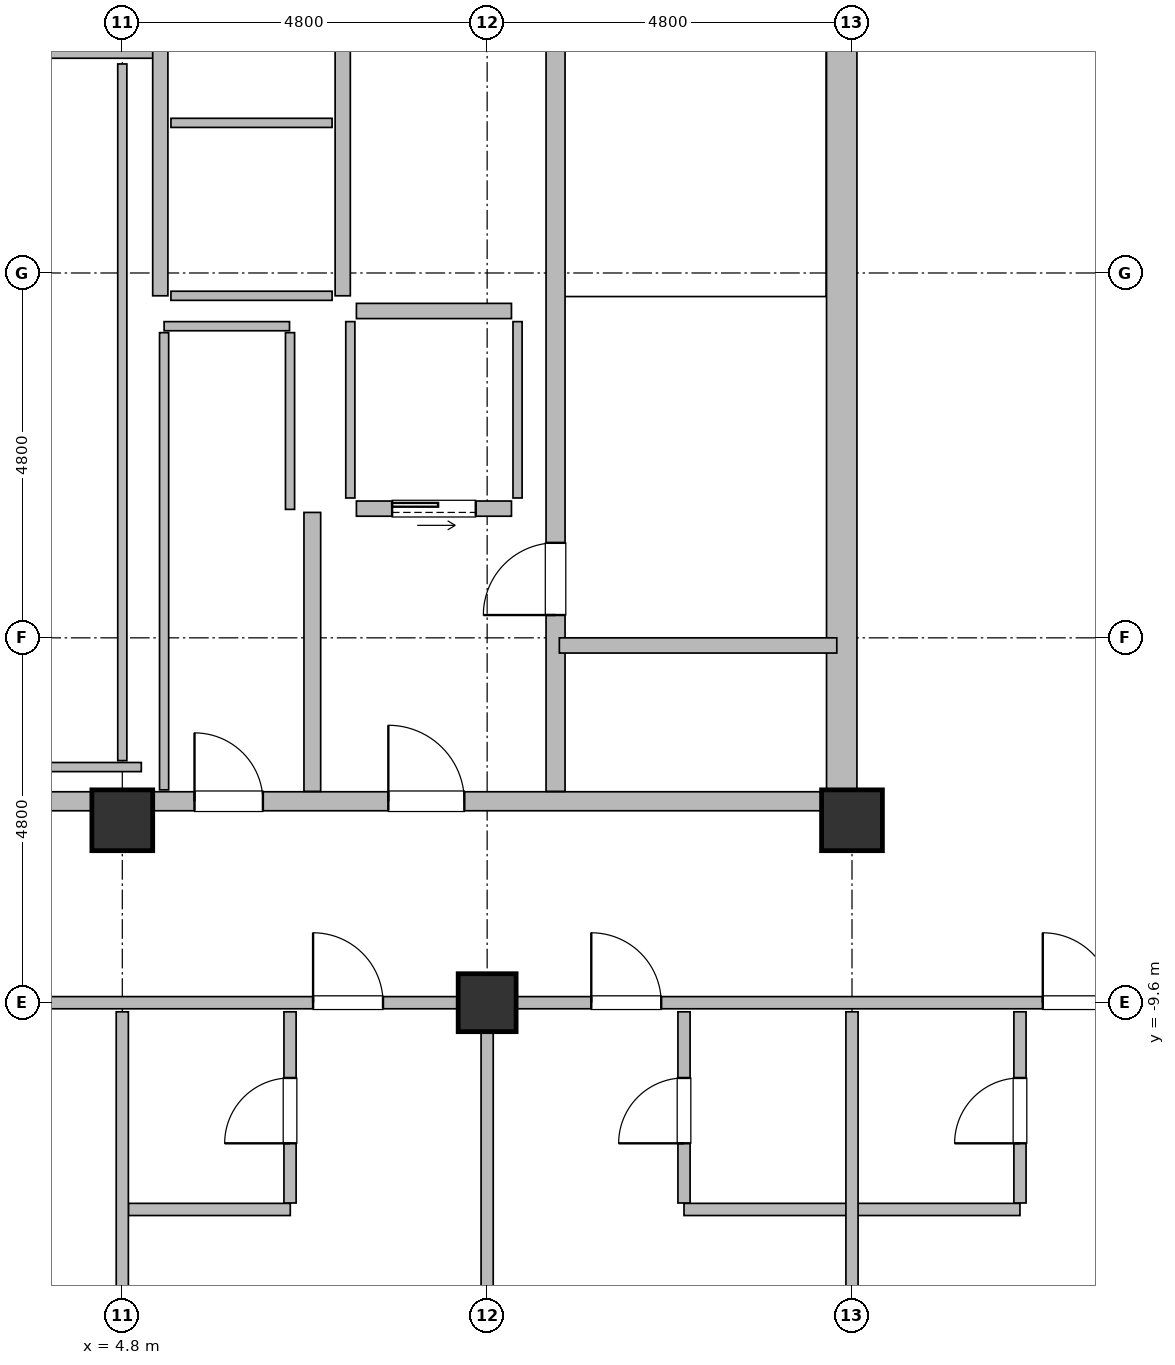
"""IFC4 building model, lengths in metres.
Left out: names, types, materials, properties, quantities, classifications, styles, units other than length and angle.
Written with IfcOpenShell. Run it as: python <this file> out.ifc"""

import sys

from ifc_helpers import new_model, si_unit, direction, frame, frame_2d, origin, origin_2d, place, context, subcontext, project, spatial, rectangle, hollow_rectangle, hollow_circle, extrude, element, fill, save


model = new_model("IFC4")
c1 = context("Model", 3, precision=1e-05, world=origin(), true_north=direction((0.0, 1.0)))
c2 = subcontext(c1, "Body", "Model", "MODEL_VIEW")
j1 = project(units=[si_unit("LENGTHUNIT", "METRE"), si_unit("PLANEANGLEUNIT", "RADIAN")], contexts=[c1])
p1 = place(None, origin())
s1 = spatial("IfcSite", under=j1, at=p1, CompositionType="ELEMENT")
p2 = place(p1, origin())
s2 = spatial("IfcBuilding", under=s1, at=p2, CompositionType="ELEMENT")
p3 = place(p2, frame((0.0, 0.0, 48.5)))
s3 = spatial("IfcBuildingStorey", under=s2, at=p3, CompositionType="ELEMENT", Elevation=48.5)
p4 = place(p3, frame((4.8, -7.2, 0.0), z_axis=(0.0, 0.0, 1.0), x_axis=(1.0, 0.0, 0.0)))
e1 = element("IfcColumn", 1, at=p4, inside=s3, PredefinedType="COLUMN", context=c2, shape_type="SweptSolid", body=[
    extrude(hollow_rectangle(XDim=0.8, YDim=0.8, WallThickness=0.036, at=origin_2d()), origin(), (0.0, 0.0, 1.0), 3.7),
])
p5 = place(p3, frame((9.6, -9.6, 0.0), z_axis=(0.0, 0.0, 1.0), x_axis=(1.0, 0.0, 0.0)))
e2 = element("IfcColumn", 2, at=p5, inside=s3, PredefinedType="COLUMN", context=c2, shape_type="SweptSolid", body=[
    extrude(hollow_circle(Radius=0.381, WallThickness=0.032, at=origin_2d()), origin(), (0.0, 0.0, 1.0), 3.7),
])
p6 = place(p3, frame((14.4, -7.2, 0.0), z_axis=(0.0, 0.0, 1.0), x_axis=(1.0, 0.0, 0.0)))
e3 = element("IfcColumn", 3, at=p6, inside=s3, PredefinedType="COLUMN", context=c2, shape_type="SweptSolid", body=[
    extrude(hollow_rectangle(XDim=0.8, YDim=0.8, WallThickness=0.036, at=origin_2d()), origin(), (0.0, 0.0, 1.0), 3.7),
])
p7 = place(p3, frame((14.265, -7.2, -0.18), z_axis=(0.0, 0.0, 1.0), x_axis=(0.0, 1.0, 0.0)))
e4 = element("IfcWall", 4, at=p7, inside=s3, PredefinedType="SHEAR", context=c2, shape_type="SweptSolid", body=[
    extrude(rectangle(XDim=14.4, YDim=0.4, at=frame_2d((7.2, 0.0))), origin(), (0.0, 0.0, 1.0), 3.7),
])
p8 = place(p3, frame((-4.6, -6.95, 0.0), z_axis=(0.0, 0.0, 1.0), x_axis=(1.0, 0.0, 0.0)))
e5 = element("IfcWall", 5, at=p8, inside=s3, PredefinedType="SOLIDWALL", context=c2, shape_type="SweptSolid", body=[
    extrude(rectangle(XDim=9.2, YDim=0.25, at=frame_2d((4.6, 0.0))), origin(), (0.0, 0.0, 1.0), 2.32),
])
p9 = place(p8, frame((0.8, 0.0, 0.0)))
e6 = element("IfcOpeningElement", 6, at=p9, cuts=e5, PredefinedType="OPENING", context=c2, shape_type="SweptSolid", body=[
    extrude(rectangle(XDim=1.2, YDim=2.2, at=frame_2d((0.6, 1.1))), frame((0.0, 0.14, 0.0), z_axis=(0.0, -1.0, 0.0), x_axis=(1.0, 0.0, 0.0)), (0.0, 0.0, 1.0), 0.28),
])
p10 = place(p8, frame((5.55, 0.0, 0.0)))
e7 = element("IfcOpeningElement", 7, at=p10, cuts=e5, PredefinedType="OPENING", context=c2, shape_type="SweptSolid", body=[
    extrude(rectangle(XDim=1.2, YDim=2.2, at=frame_2d((0.6, 1.1))), frame((0.0, 0.14, 0.0), z_axis=(0.0, -1.0, 0.0), x_axis=(1.0, 0.0, 0.0)), (0.0, 0.0, 1.0), 0.28),
])
p11 = place(p3, frame((4.8, -6.95, 0.0), z_axis=(0.0, 0.0, 1.0), x_axis=(1.0, 0.0, 0.0)))
e8 = element("IfcWall", 8, at=p11, inside=s3, PredefinedType="SOLIDWALL", context=c2, shape_type="SweptSolid", body=[
    extrude(rectangle(XDim=9.4, YDim=0.25, at=frame_2d((4.7, 0.0))), origin(), (0.0, 0.0, 1.0), 2.62),
])
p12 = place(p11, frame((3.5, 0.0, 0.0)))
e9 = element("IfcOpeningElement", 9, at=p12, cuts=e8, PredefinedType="OPENING", context=c2, shape_type="SweptSolid", body=[
    extrude(rectangle(XDim=1.0, YDim=2.15, at=frame_2d((0.5, 1.075))), frame((0.0, 0.14, 0.0), z_axis=(0.0, -1.0, 0.0), x_axis=(1.0, 0.0, 0.0)), (0.0, 0.0, 1.0), 0.28),
])
p13 = place(p11, frame((0.95, 0.0, 0.0)))
e10 = element("IfcOpeningElement", 10, at=p13, cuts=e8, PredefinedType="OPENING", context=c2, shape_type="SweptSolid", body=[
    extrude(rectangle(XDim=0.9, YDim=2.1, at=frame_2d((0.45, 1.05))), frame((0.0, 0.14, 0.0), z_axis=(0.0, -1.0, 0.0), x_axis=(1.0, 0.0, 0.0)), (0.0, 0.0, 1.0), 0.28),
])
p14 = place(p3, frame((7.3, -6.82, 0.0), z_axis=(0.0, 0.0, 1.0), x_axis=(0.0, 1.0, 0.0)))
e11 = element("IfcWall", 11, at=p14, inside=s3, PredefinedType="SOLIDWALL", context=c2, shape_type="SweptSolid", body=[
    extrude(rectangle(XDim=3.67, YDim=0.22, at=frame_2d((1.835, 0.0))), origin(), (0.0, 0.0, 1.0), 2.62),
])
p15 = place(p3, frame((10.5, -6.82, -0.18), z_axis=(0.0, 0.0, 1.0), x_axis=(0.0, 1.0, 0.0)))
e12 = element("IfcWall", 12, at=p15, inside=s3, PredefinedType="SOLIDWALL", context=c2, shape_type="SweptSolid", body=[
    extrude(rectangle(XDim=13.64, YDim=0.25, at=frame_2d((6.82, 0.0))), origin(), (0.0, 0.0, 1.0), 3.7),
])
p16 = place(p15, frame((2.32, 0.0, 0.18)))
e13 = element("IfcOpeningElement", 13, at=p16, cuts=e12, PredefinedType="OPENING", context=c2, shape_type="SweptSolid", body=[
    extrude(rectangle(XDim=0.95, YDim=2.15, at=frame_2d((0.475, 1.075))), frame((0.0, 0.14, 0.0), z_axis=(0.0, -1.0, 0.0), x_axis=(1.0, 0.0, 0.0)), (0.0, 0.0, 1.0), 0.28),
])
p17 = place(p3, frame((10.55, -4.9, -0.18), z_axis=(0.0, 0.0, 1.0), x_axis=(1.0, 0.0, 0.0)))
e14 = element("IfcWall", 14, at=p17, inside=s3, PredefinedType="SOLIDWALL", context=c2, shape_type="SweptSolid", body=[
    extrude(rectangle(XDim=3.65, YDim=0.2, at=frame_2d((1.825, 0.0))), origin(), (0.0, 0.0, 1.0), 3.7),
])
p18 = place(p3, frame((-4.65, 2.95, -0.18), z_axis=(0.0, 0.0, 1.0), x_axis=(1.0, 0.0, 0.0)))
e15 = element("IfcWall", 15, at=p18, inside=s3, PredefinedType="SOLIDWALL", context=c2, shape_type="SweptSolid", body=[
    extrude(rectangle(XDim=9.9, YDim=0.25, at=frame_2d((4.95, 0.0))), origin(), (0.0, 0.0, 1.0), 3.7),
])
p19 = place(p18, frame((0.65, 0.0, 0.18)))
e16 = element("IfcOpeningElement", 16, at=p19, cuts=e15, PredefinedType="OPENING", context=c2, shape_type="SweptSolid", body=[
    extrude(rectangle(XDim=0.95, YDim=2.15, at=frame_2d((0.475, 1.075))), frame((0.0, 0.14, 0.0), z_axis=(0.0, -1.0, 0.0), x_axis=(1.0, 0.0, 0.0)), (0.0, 0.0, 1.0), 0.28),
])
for number, where, z_axis, x_axis in (
    (17, (7.7, -0.3, 0.0), (0.0, 0.0, 1.0), (0.0, 1.0, 0.0)),
    (18, (5.3, -0.3, 0.0), (0.0, 0.0, 1.0), (0.0, 1.0, 0.0)),
):
    element("IfcWall", number, at=place(p3, frame(where, z_axis=z_axis, x_axis=x_axis)), inside=s3, PredefinedType="SOLIDWALL", context=c2, shape_type="SweptSolid", body=[
        extrude(rectangle(XDim=6.8, YDim=0.2, at=frame_2d((3.4, 0.0))), origin(), (0.0, 0.0, 1.0), 3.52),
    ])
for number, where, z_axis, x_axis in (
    (19, (5.44, -0.3, 0.0), (0.0, 0.0, 1.0), (1.0, 0.0, 0.0)),
    (20, (5.44, 1.975, 0.0), (0.0, 0.0, 1.0), (1.0, 0.0, 0.0)),
):
    element("IfcWall", number, at=place(p3, frame(where, z_axis=z_axis, x_axis=x_axis)), inside=s3, PredefinedType="PARTITIONING", context=c2, shape_type="SweptSolid", body=[
        extrude(rectangle(XDim=2.12, YDim=0.12, at=frame_2d((1.06, 0.0))), origin(), (0.0, 0.0, 1.0), 3.52),
    ])
p20 = place(p3, frame((7.88, -3.1, 0.0), z_axis=(0.0, 0.0, 1.0), x_axis=(1.0, 0.0, 0.0)))
e21 = element("IfcWall", 21, at=p20, inside=s3, PredefinedType="SOLIDWALL", context=c2, shape_type="SweptSolid", body=[
    extrude(rectangle(XDim=2.04, YDim=0.2, at=frame_2d((1.02, 0.0))), origin(), (0.0, 0.0, 1.0), 3.52),
])
p21 = place(p20, frame((0.47, 0.0, 0.0)))
e22 = element("IfcOpeningElement", 22, at=p21, cuts=e21, PredefinedType="OPENING", context=c2, shape_type="SweptSolid", body=[
    extrude(rectangle(XDim=1.1, YDim=2.2, at=frame_2d((0.55, 1.1))), frame((0.0, 0.115, 0.0), z_axis=(0.0, -1.0, 0.0), x_axis=(1.0, 0.0, 0.0)), (0.0, 0.0, 1.0), 0.23),
])
p22 = place(p3, frame((7.88, -0.5, 0.0), z_axis=(0.0, 0.0, 1.0), x_axis=(1.0, 0.0, 0.0)))
e23 = element("IfcWall", 23, at=p22, inside=s3, PredefinedType="SOLIDWALL", context=c2, shape_type="SweptSolid", body=[
    extrude(rectangle(XDim=2.04, YDim=0.2, at=frame_2d((1.02, 0.0))), origin(), (0.0, 0.0, 1.0), 3.52),
])
for number, where, z_axis, x_axis in (
    (24, (7.8, -2.96, 0.0), (0.0, 0.0, 1.0), (0.0, 1.0, 0.0)),
    (25, (10.0, -2.96, 0.0), (0.0, 0.0, 1.0), (0.0, 1.0, 0.0)),
):
    element("IfcWall", number, at=place(p3, frame(where, z_axis=z_axis, x_axis=x_axis)), inside=s3, PredefinedType="PARTITIONING", context=c2, shape_type="SweptSolid", body=[
        extrude(rectangle(XDim=2.32, YDim=0.12, at=frame_2d((1.16, 0.0))), origin(), (0.0, 0.0, 1.0), 3.52),
    ])
p23 = place(p3, frame((4.88, -12.32, 0.0), z_axis=(0.0, 0.0, 1.0), x_axis=(1.0, 0.0, 0.0)))
e26 = element("IfcWall", 26, at=p23, inside=s3, PredefinedType="PARTITIONING", context=c2, shape_type="SweptSolid", body=[
    extrude(rectangle(XDim=2.13, YDim=0.16, at=frame_2d((1.065, 0.0))), origin(), (0.0, 0.0, 1.0), 2.82),
])
p24 = place(p3, frame((12.19, -12.32, 0.0), z_axis=(0.0, 0.0, 1.0), x_axis=(1.0, 0.0, 0.0)))
e27 = element("IfcWall", 27, at=p24, inside=s3, PredefinedType="PARTITIONING", context=c2, shape_type="SweptSolid", body=[
    extrude(rectangle(XDim=4.42, YDim=0.16, at=frame_2d((2.21, 0.0))), origin(), (0.0, 0.0, 1.0), 2.82),
])
p25 = place(p3, frame((-33.31, -9.6, 0.0), z_axis=(0.0, 0.0, 1.0), x_axis=(1.0, 0.0, 0.0)))
e28 = element("IfcWall", 28, at=p25, inside=s3, PredefinedType="PARTITIONING", context=c2, shape_type="SweptSolid", body=[
    extrude(rectangle(XDim=61.82, YDim=0.16, at=frame_2d((30.91, 0.0))), origin(), (0.0, 0.0, 1.0), 2.62),
])
p26 = place(p25, frame((6.42, 0.0, 0.0)))
e29 = element("IfcOpeningElement", 29, at=p26, cuts=e28, PredefinedType="OPENING", context=c2, shape_type="SweptSolid", body=[
    extrude(rectangle(XDim=0.9, YDim=2.1, at=frame_2d((0.45, 1.05))), frame((0.0, 0.095, 0.0), z_axis=(0.0, -1.0, 0.0), x_axis=(1.0, 0.0, 0.0)), (0.0, 0.0, 1.0), 0.19),
])
p27 = place(p25, frame((54.5, 0.0, 0.0)))
e30 = element("IfcOpeningElement", 30, at=p27, cuts=e28, PredefinedType="OPENING", context=c2, shape_type="SweptSolid", body=[
    extrude(rectangle(XDim=0.9, YDim=2.1, at=frame_2d((0.45, 1.05))), frame((0.0, 0.095, 0.0), z_axis=(0.0, -1.0, 0.0), x_axis=(1.0, 0.0, 0.0)), (0.0, 0.0, 1.0), 0.19),
])
p28 = place(p25, frame((11.26, 0.0, 0.0)))
e31 = element("IfcOpeningElement", 31, at=p28, cuts=e28, PredefinedType="OPENING", context=c2, shape_type="SweptSolid", body=[
    extrude(rectangle(XDim=0.9, YDim=2.1, at=frame_2d((0.45, 1.05))), frame((0.0, 0.095, 0.0), z_axis=(0.0, -1.0, 0.0), x_axis=(1.0, 0.0, 0.0)), (0.0, 0.0, 1.0), 0.19),
])
p29 = place(p25, frame((30.425, 0.0, 0.0)))
e32 = element("IfcOpeningElement", 32, at=p29, cuts=e28, PredefinedType="OPENING", context=c2, shape_type="SweptSolid", body=[
    extrude(rectangle(XDim=1.05, YDim=2.2, at=frame_2d((0.525, 1.1))), frame((0.0, 0.095, 0.0), z_axis=(0.0, -1.0, 0.0), x_axis=(1.0, 0.0, 0.0)), (0.0, 0.0, 1.0), 0.19),
])
p30 = place(p25, frame((40.62, 0.0, 0.0)))
e33 = element("IfcOpeningElement", 33, at=p30, cuts=e28, PredefinedType="OPENING", context=c2, shape_type="SweptSolid", body=[
    extrude(rectangle(XDim=0.92, YDim=2.15, at=frame_2d((0.46, 1.075))), frame((0.0, 0.095, 0.0), z_axis=(0.0, -1.0, 0.0), x_axis=(1.0, 0.0, 0.0)), (0.0, 0.0, 1.0), 0.19),
])
p31 = place(p25, frame((44.28, 0.0, 0.0)))
e34 = element("IfcOpeningElement", 34, at=p31, cuts=e28, PredefinedType="OPENING", context=c2, shape_type="SweptSolid", body=[
    extrude(rectangle(XDim=0.92, YDim=2.15, at=frame_2d((0.46, 1.075))), frame((0.0, 0.095, 0.0), z_axis=(0.0, -1.0, 0.0), x_axis=(1.0, 0.0, 0.0)), (0.0, 0.0, 1.0), 0.19),
])
p32 = place(p25, frame((50.22, 0.0, 0.0)))
e35 = element("IfcOpeningElement", 35, at=p32, cuts=e28, PredefinedType="OPENING", context=c2, shape_type="SweptSolid", body=[
    extrude(rectangle(XDim=0.92, YDim=2.15, at=frame_2d((0.46, 1.075))), frame((0.0, 0.095, 0.0), z_axis=(0.0, -1.0, 0.0), x_axis=(1.0, 0.0, 0.0)), (0.0, 0.0, 1.0), 0.19),
])
p33 = place(p3, frame((2.6, -6.5, 0.0), z_axis=(0.0, 0.0, 1.0), x_axis=(1.0, 0.0, 0.0)))
e36 = element("IfcWall", 36, at=p33, inside=s3, PredefinedType="PARTITIONING", context=c2, shape_type="SweptSolid", body=[
    extrude(rectangle(XDim=2.45, YDim=0.12, at=frame_2d((1.225, 0.0))), origin(), (0.0, 0.0, 1.0), 3.52),
])
p34 = place(p3, frame((5.35, -0.7, 0.0), z_axis=(0.0, 0.0, 1.0), x_axis=(1.0, 0.0, 0.0)))
e37 = element("IfcWall", 37, at=p34, inside=s3, PredefinedType="PARTITIONING", context=c2, shape_type="SweptSolid", body=[
    extrude(rectangle(XDim=1.65, YDim=0.12, at=frame_2d((0.825, 0.0))), origin(), (0.0, 0.0, 1.0), 3.52),
])
p35 = place(p3, frame((4.8, -23.71, 0.0), z_axis=(0.0, 0.0, 1.0), x_axis=(0.0, 1.0, 0.0)))
e38 = element("IfcWall", 38, at=p35, inside=s3, PredefinedType="PARTITIONING", context=c2, shape_type="SweptSolid", body=[
    extrude(rectangle(XDim=13.99, YDim=0.16, at=frame_2d((6.995, 0.0))), origin(), (0.0, 0.0, 1.0), 2.62),
])
p36 = place(p3, frame((4.8, -6.415, 0.0), z_axis=(0.0, 0.0, 1.0), x_axis=(0.0, 1.0, 0.0)))
e39 = element("IfcWall", 39, at=p36, inside=s3, PredefinedType="PARTITIONING", context=c2, shape_type="SweptSolid", body=[
    extrude(rectangle(XDim=9.165, YDim=0.12, at=frame_2d((4.583, 0.0))), origin(), (0.0, 0.0, 1.0), 3.52),
])
p37 = place(p3, frame((5.35, -6.8, 0.0), z_axis=(0.0, 0.0, 1.0), x_axis=(0.0, 1.0, 0.0)))
e40 = element("IfcWall", 40, at=p37, inside=s3, PredefinedType="PARTITIONING", context=c2, shape_type="SweptSolid", body=[
    extrude(rectangle(XDim=6.015, YDim=0.12, at=frame_2d((3.008, 0.0))), origin(), (0.0, 0.0, 1.0), 2.62),
])
p38 = place(p3, frame((7.007, -12.235, 0.0), z_axis=(0.0, 0.0, 1.0), x_axis=(0.0, 1.0, 0.0)))
e41 = element("IfcWall", 41, at=p38, inside=s3, PredefinedType="PARTITIONING", context=c2, shape_type="SweptSolid", body=[
    extrude(rectangle(XDim=2.515, YDim=0.16, at=frame_2d((1.258, 0.0))), origin(), (0.0, 0.0, 1.0), 2.62),
])
p39 = place(p38, frame((0.785, 0.0, 0.0)))
e42 = element("IfcOpeningElement", 42, at=p39, cuts=e41, PredefinedType="OPENING", context=c2, shape_type="SweptSolid", body=[
    extrude(rectangle(XDim=0.86, YDim=2.1, at=frame_2d((0.43, 1.05))), frame((0.0, 0.095, 0.0), z_axis=(0.0, -1.0, 0.0), x_axis=(1.0, 0.0, 0.0)), (0.0, 0.0, 1.0), 0.19),
])
p40 = place(p3, frame((7.007, -3.11, 0.0), z_axis=(0.0, 0.0, 1.0), x_axis=(0.0, 1.0, 0.0)))
e43 = element("IfcWall", 43, at=p40, inside=s3, PredefinedType="PARTITIONING", context=c2, shape_type="SweptSolid", body=[
    extrude(rectangle(XDim=2.325, YDim=0.12, at=frame_2d((1.163, 0.0))), origin(), (0.0, 0.0, 1.0), 3.52),
])
p41 = place(p3, frame((9.6, -23.71, 0.0), z_axis=(0.0, 0.0, 1.0), x_axis=(0.0, 1.0, 0.0)))
e44 = element("IfcWall", 44, at=p41, inside=s3, PredefinedType="PARTITIONING", context=c2, shape_type="SweptSolid", body=[
    extrude(rectangle(XDim=13.99, YDim=0.16, at=frame_2d((6.995, 0.0))), origin(), (0.0, 0.0, 1.0), 2.62),
])
p42 = place(p3, frame((12.19, -12.235, 0.0), z_axis=(0.0, 0.0, 1.0), x_axis=(0.0, 1.0, 0.0)))
e45 = element("IfcWall", 45, at=p42, inside=s3, PredefinedType="PARTITIONING", context=c2, shape_type="SweptSolid", body=[
    extrude(rectangle(XDim=2.515, YDim=0.16, at=frame_2d((1.258, 0.0))), origin(), (0.0, 0.0, 1.0), 2.62),
])
p43 = place(p42, frame((0.785, 0.0, 0.0)))
e46 = element("IfcOpeningElement", 46, at=p43, cuts=e45, PredefinedType="OPENING", context=c2, shape_type="SweptSolid", body=[
    extrude(rectangle(XDim=0.86, YDim=2.1, at=frame_2d((0.43, 1.05))), frame((0.0, 0.095, 0.0), z_axis=(0.0, -1.0, 0.0), x_axis=(1.0, 0.0, 0.0)), (0.0, 0.0, 1.0), 0.19),
])
p44 = place(p3, frame((14.4, -23.71, 0.0), z_axis=(0.0, 0.0, 1.0), x_axis=(0.0, 1.0, 0.0)))
e47 = element("IfcWall", 47, at=p44, inside=s3, PredefinedType="PARTITIONING", context=c2, shape_type="SweptSolid", body=[
    extrude(rectangle(XDim=13.99, YDim=0.16, at=frame_2d((6.995, 0.0))), origin(), (0.0, 0.0, 1.0), 2.62),
])
p45 = place(p3, frame((16.61, -12.235, 0.0), z_axis=(0.0, 0.0, 1.0), x_axis=(0.0, 1.0, 0.0)))
e48 = element("IfcWall", 48, at=p45, inside=s3, PredefinedType="PARTITIONING", context=c2, shape_type="SweptSolid", body=[
    extrude(rectangle(XDim=2.515, YDim=0.16, at=frame_2d((1.258, 0.0))), origin(), (0.0, 0.0, 1.0), 2.62),
])
p46 = place(p45, frame((0.785, 0.0, 0.0)))
e49 = element("IfcOpeningElement", 49, at=p46, cuts=e48, PredefinedType="OPENING", context=c2, shape_type="SweptSolid", body=[
    extrude(rectangle(XDim=0.86, YDim=2.1, at=frame_2d((0.43, 1.05))), frame((0.0, 0.095, 0.0), z_axis=(0.0, -1.0, 0.0), x_axis=(1.0, 0.0, 0.0)), (0.0, 0.0, 1.0), 0.19),
])
p47 = place(p12, origin())
e50 = element("IfcDoor", 50, at=p47, inside=s3, OperationType="SINGLE_SWING_RIGHT", PredefinedType="DOOR", context=c2, shape_type="SweptSolid", body=[
    extrude(rectangle(XDim=1.0, YDim=2.15, at=frame_2d((0.5, 1.075))), frame((0.0, 0.025, 0.0), z_axis=(0.0, -1.0, 0.0), x_axis=(1.0, 0.0, 0.0)), (0.0, 0.0, 1.0), 0.05),
])
fill(e9, e50)
p48 = place(p16, origin())
e51 = element("IfcDoor", 51, at=p48, inside=s3, OperationType="SINGLE_SWING_LEFT", PredefinedType="DOOR", context=c2, shape_type="SweptSolid", body=[
    extrude(rectangle(XDim=0.95, YDim=2.15, at=frame_2d((0.475, 1.075))), frame((0.0, 0.025, 0.0), z_axis=(0.0, -1.0, 0.0), x_axis=(1.0, 0.0, 0.0)), (0.0, 0.0, 1.0), 0.05),
])
fill(e13, e51)
p49 = place(p21, origin())
e52 = element("IfcDoor", 52, at=p49, inside=s3, OperationType="SLIDING_TO_LEFT", PredefinedType="DOOR", context=c2, shape_type="SweptSolid", body=[
    extrude(rectangle(XDim=1.1, YDim=2.2, at=frame_2d((0.55, 1.1))), frame((0.0, 0.025, 0.0), z_axis=(0.0, -1.0, 0.0), x_axis=(1.0, 0.0, 0.0)), (0.0, 0.0, 1.0), 0.05),
])
fill(e22, e52)
p50 = place(p13, origin())
e53 = element("IfcDoor", 53, at=p50, inside=s3, OperationType="SINGLE_SWING_LEFT", PredefinedType="DOOR", context=c2, shape_type="SweptSolid", body=[
    extrude(rectangle(XDim=0.9, YDim=2.1, at=frame_2d((0.45, 1.05))), frame((0.0, 0.025, 0.0), z_axis=(0.0, -1.0, 0.0), x_axis=(1.0, 0.0, 0.0)), (0.0, 0.0, 1.0), 0.05),
])
fill(e10, e53)
p51 = place(p30, origin())
e54 = element("IfcDoor", 54, at=p51, inside=s3, OperationType="SINGLE_SWING_LEFT", PredefinedType="DOOR", context=c2, shape_type="SweptSolid", body=[
    extrude(rectangle(XDim=0.92, YDim=2.15, at=frame_2d((0.46, 1.075))), frame((0.0, 0.025, 0.0), z_axis=(0.0, -1.0, 0.0), x_axis=(1.0, 0.0, 0.0)), (0.0, 0.0, 1.0), 0.05),
])
fill(e33, e54)
p52 = place(p39, origin())
e55 = element("IfcDoor", 55, at=p52, inside=s3, OperationType="SINGLE_SWING_RIGHT", PredefinedType="DOOR", context=c2, shape_type="SweptSolid", body=[
    extrude(rectangle(XDim=0.86, YDim=2.1, at=frame_2d((0.43, 1.05))), frame((0.0, 0.025, 0.0), z_axis=(0.0, -1.0, 0.0), x_axis=(1.0, 0.0, 0.0)), (0.0, 0.0, 1.0), 0.05),
])
fill(e42, e55)
p53 = place(p31, origin())
e56 = element("IfcDoor", 56, at=p53, inside=s3, OperationType="SINGLE_SWING_RIGHT", PredefinedType="DOOR", context=c2, shape_type="SweptSolid", body=[
    extrude(rectangle(XDim=0.92, YDim=2.15, at=frame_2d((0.46, 1.075))), frame((0.0, 0.025, 0.0), z_axis=(0.0, -1.0, 0.0), x_axis=(1.0, 0.0, 0.0)), (0.0, 0.0, 1.0), 0.05),
])
fill(e34, e56)
p54 = place(p43, origin())
e57 = element("IfcDoor", 57, at=p54, inside=s3, OperationType="SINGLE_SWING_LEFT", PredefinedType="DOOR", context=c2, shape_type="SweptSolid", body=[
    extrude(rectangle(XDim=0.86, YDim=2.1, at=frame_2d((0.43, 1.05))), frame((0.0, 0.025, 0.0), z_axis=(0.0, -1.0, 0.0), x_axis=(1.0, 0.0, 0.0)), (0.0, 0.0, 1.0), 0.05),
])
fill(e46, e57)
p55 = place(p32, origin())
e58 = element("IfcDoor", 58, at=p55, inside=s3, OperationType="SINGLE_SWING_RIGHT", PredefinedType="DOOR", context=c2, shape_type="SweptSolid", body=[
    extrude(rectangle(XDim=0.92, YDim=2.15, at=frame_2d((0.46, 1.075))), frame((0.0, 0.025, 0.0), z_axis=(0.0, -1.0, 0.0), x_axis=(1.0, 0.0, 0.0)), (0.0, 0.0, 1.0), 0.05),
])
fill(e35, e58)
p56 = place(p46, origin())
e59 = element("IfcDoor", 59, at=p56, inside=s3, OperationType="SINGLE_SWING_LEFT", PredefinedType="DOOR", context=c2, shape_type="SweptSolid", body=[
    extrude(rectangle(XDim=0.86, YDim=2.1, at=frame_2d((0.43, 1.05))), frame((0.0, 0.025, 0.0), z_axis=(0.0, -1.0, 0.0), x_axis=(1.0, 0.0, 0.0)), (0.0, 0.0, 1.0), 0.05),
])
fill(e49, e59)
save(model, sys.argv[1])
